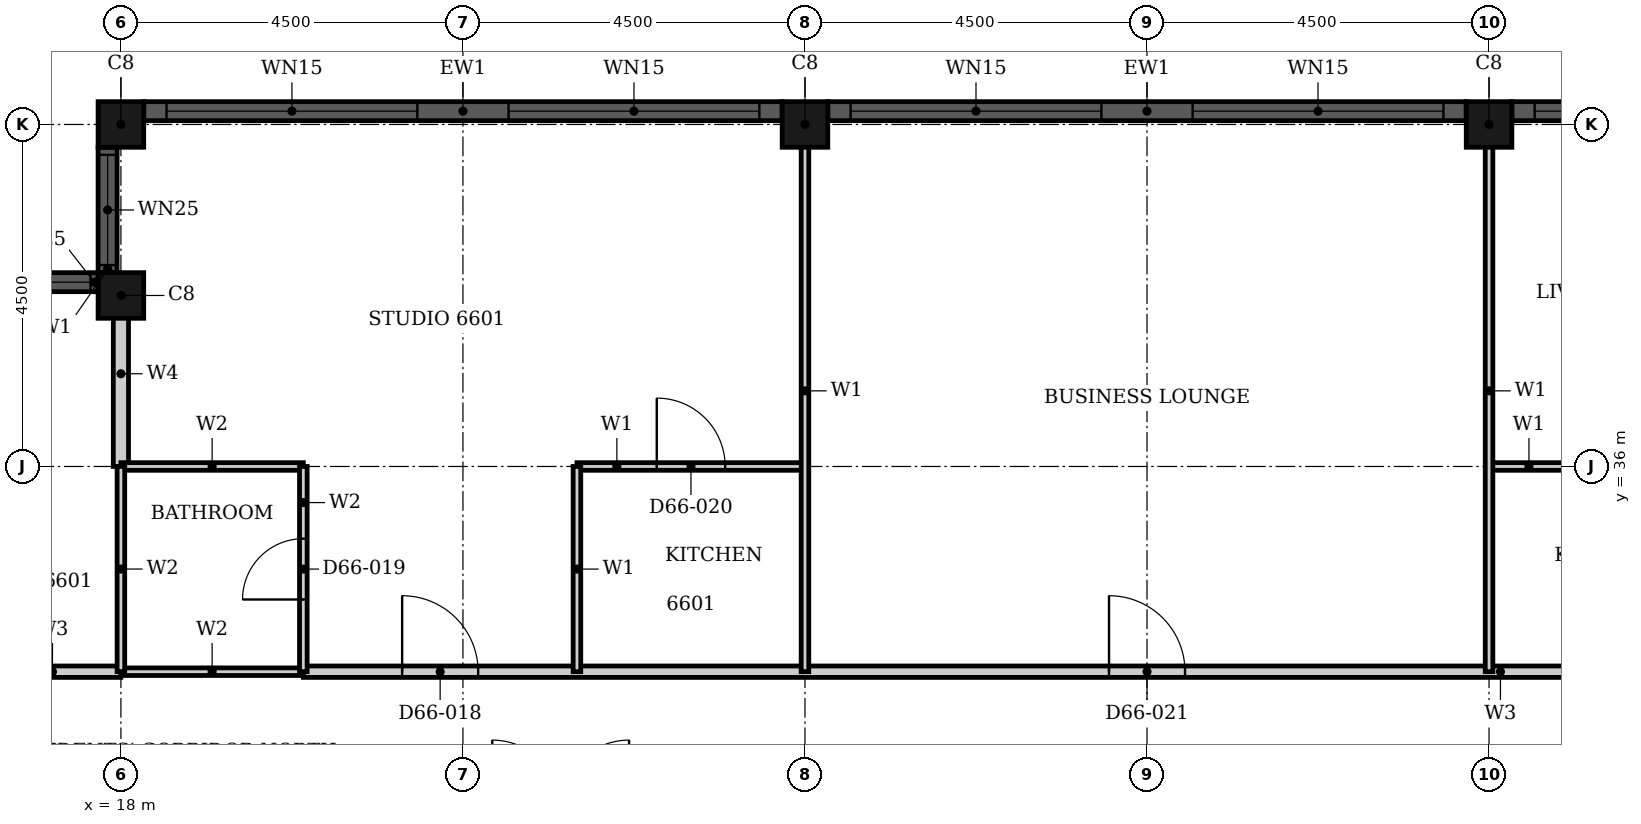
"""IFC4 building model, lengths in metres.
Left out: names, types, materials, properties, quantities, classifications, styles, units other than length and angle.
Written with IfcOpenShell. Run it as: python <this file> out.ifc"""

import sys

from ifc_helpers import new_model, si_unit, direction, frame, frame_2d, origin, origin_2d, place, context, subcontext, project, spatial, rectangle, hollow_rectangle, extrude, element, fill, save


model = new_model("IFC4")
c1 = context("Model", 3, precision=1e-05, world=origin(), true_north=direction((0.0, 1.0)))
c2 = subcontext(c1, "Body", "Model", "MODEL_VIEW")
j1 = project(units=[si_unit("LENGTHUNIT", "METRE"), si_unit("PLANEANGLEUNIT", "RADIAN")], contexts=[c1])
p1 = place(None, origin())
s1 = spatial("IfcSite", under=j1, at=p1, CompositionType="ELEMENT")
p2 = place(p1, origin())
s2 = spatial("IfcBuilding", under=s1, at=p2, CompositionType="ELEMENT")
p3 = place(p2, frame((0.0, 0.0, 260.1)))
s3 = spatial("IfcBuildingStorey", under=s2, at=p3, CompositionType="ELEMENT", Elevation=260.1)
for number, where, z_axis, x_axis in (
    (1, (36.0, 40.5, 0.0), (0.0, 0.0, 1.0), (1.0, 0.0, 0.0)),
    (2, (27.0, 40.5, 0.0), (0.0, 0.0, 1.0), (1.0, 0.0, 0.0)),
    (3, (18.0, 40.5, 0.0), (0.0, 0.0, 1.0), (1.0, 0.0, 0.0)),
    (4, (18.0, 38.25, 0.0), (0.0, 0.0, 1.0), (1.0, 0.0, 0.0)),
):
    element("IfcColumn", number, at=place(p3, frame(where, z_axis=z_axis, x_axis=x_axis)), inside=s3, PredefinedType="COLUMN", context=c2, shape_type="SweptSolid", body=[
        extrude(hollow_rectangle(XDim=0.6, YDim=0.6, WallThickness=0.02, at=origin_2d()), origin(), (0.0, 0.0, 1.0), 3.7),
    ])
p4 = place(p3, frame((44.7, 40.675, 0.0), z_axis=(0.0, 0.0, 1.0), x_axis=(-1.0, 0.0, 0.0)))
e5 = element("IfcWall", 5, at=p4, inside=s3, PredefinedType="SOLIDWALL", context=c2, shape_type="SweptSolid", body=[
    extrude(rectangle(XDim=8.4, YDim=0.25, at=frame_2d((4.2, 0.0))), origin(), (0.0, 0.0, 1.0), 3.7),
])
p5 = place(p4, frame((0.3, 0.0, 0.45)))
e6 = element("IfcOpeningElement", 6, at=p5, cuts=e5, PredefinedType="OPENING", context=c2, shape_type="SweptSolid", body=[
    extrude(rectangle(XDim=3.3, YDim=2.3, at=frame_2d((1.65, 1.15))), frame((0.0, 0.135, 0.0), z_axis=(0.0, -1.0, 0.0), x_axis=(1.0, 0.0, 0.0)), (0.0, 0.0, 1.0), 0.27),
])
p6 = place(p4, frame((4.8, 0.0, 0.45)))
e7 = element("IfcOpeningElement", 7, at=p6, cuts=e5, PredefinedType="OPENING", context=c2, shape_type="SweptSolid", body=[
    extrude(rectangle(XDim=3.3, YDim=2.3, at=frame_2d((1.65, 1.15))), frame((0.0, 0.135, 0.0), z_axis=(0.0, -1.0, 0.0), x_axis=(1.0, 0.0, 0.0)), (0.0, 0.0, 1.0), 0.27),
])
p7 = place(p3, frame((35.7, 40.675, 0.0), z_axis=(0.0, 0.0, 1.0), x_axis=(-1.0, 0.0, 0.0)))
e8 = element("IfcWall", 8, at=p7, inside=s3, PredefinedType="SOLIDWALL", context=c2, shape_type="SweptSolid", body=[
    extrude(rectangle(XDim=8.4, YDim=0.25, at=frame_2d((4.2, 0.0))), origin(), (0.0, 0.0, 1.0), 3.7),
])
p8 = place(p7, frame((0.3, 0.0, 0.45)))
e9 = element("IfcOpeningElement", 9, at=p8, cuts=e8, PredefinedType="OPENING", context=c2, shape_type="SweptSolid", body=[
    extrude(rectangle(XDim=3.3, YDim=2.3, at=frame_2d((1.65, 1.15))), frame((0.0, 0.135, 0.0), z_axis=(0.0, -1.0, 0.0), x_axis=(1.0, 0.0, 0.0)), (0.0, 0.0, 1.0), 0.27),
])
p9 = place(p7, frame((4.8, 0.0, 0.45)))
e10 = element("IfcOpeningElement", 10, at=p9, cuts=e8, PredefinedType="OPENING", context=c2, shape_type="SweptSolid", body=[
    extrude(rectangle(XDim=3.3, YDim=2.3, at=frame_2d((1.65, 1.15))), frame((0.0, 0.135, 0.0), z_axis=(0.0, -1.0, 0.0), x_axis=(1.0, 0.0, 0.0)), (0.0, 0.0, 1.0), 0.27),
])
p10 = place(p3, frame((26.7, 40.675, 0.0), z_axis=(0.0, 0.0, 1.0), x_axis=(-1.0, 0.0, 0.0)))
e11 = element("IfcWall", 11, at=p10, inside=s3, PredefinedType="SOLIDWALL", context=c2, shape_type="SweptSolid", body=[
    extrude(rectangle(XDim=8.4, YDim=0.25, at=frame_2d((4.2, 0.0))), origin(), (0.0, 0.0, 1.0), 3.7),
])
p11 = place(p10, frame((0.3, 0.0, 0.45)))
e12 = element("IfcOpeningElement", 12, at=p11, cuts=e11, PredefinedType="OPENING", context=c2, shape_type="SweptSolid", body=[
    extrude(rectangle(XDim=3.3, YDim=2.3, at=frame_2d((1.65, 1.15))), frame((0.0, 0.135, 0.0), z_axis=(0.0, -1.0, 0.0), x_axis=(1.0, 0.0, 0.0)), (0.0, 0.0, 1.0), 0.27),
])
p12 = place(p10, frame((4.8, 0.0, 0.45)))
e13 = element("IfcOpeningElement", 13, at=p12, cuts=e11, PredefinedType="OPENING", context=c2, shape_type="SweptSolid", body=[
    extrude(rectangle(XDim=3.3, YDim=2.3, at=frame_2d((1.65, 1.15))), frame((0.0, 0.135, 0.0), z_axis=(0.0, -1.0, 0.0), x_axis=(1.0, 0.0, 0.0)), (0.0, 0.0, 1.0), 0.27),
])
p13 = place(p3, frame((17.825, 40.2, 0.0), z_axis=(0.0, 0.0, 1.0), x_axis=(0.0, -1.0, 0.0)))
e14 = element("IfcWall", 14, at=p13, inside=s3, PredefinedType="SOLIDWALL", context=c2, shape_type="SweptSolid", body=[
    extrude(rectangle(XDim=1.65, YDim=0.25, at=frame_2d((0.825, 0.0))), origin(), (0.0, 0.0, 1.0), 3.7),
])
p14 = place(p13, frame((0.1, 0.0, 0.9)))
e15 = element("IfcOpeningElement", 15, at=p14, cuts=e14, PredefinedType="OPENING", context=c2, shape_type="SweptSolid", body=[
    extrude(rectangle(XDim=1.45, YDim=1.85, at=frame_2d((0.725, 0.925))), frame((0.0, 0.135, 0.0), z_axis=(0.0, -1.0, 0.0), x_axis=(1.0, 0.0, 0.0)), (0.0, 0.0, 1.0), 0.27),
])
p15 = place(p3, frame((17.7, 38.425, 0.0), z_axis=(0.0, 0.0, 1.0), x_axis=(-1.0, 0.0, 0.0)))
e16 = element("IfcWall", 16, at=p15, inside=s3, PredefinedType="SOLIDWALL", context=c2, shape_type="SweptSolid", body=[
    extrude(rectangle(XDim=1.65, YDim=0.25, at=frame_2d((0.825, 0.0))), origin(), (0.0, 0.0, 1.0), 3.7),
])
p16 = place(p15, frame((0.1, 0.0, 0.9)))
e17 = element("IfcOpeningElement", 17, at=p16, cuts=e16, PredefinedType="OPENING", context=c2, shape_type="SweptSolid", body=[
    extrude(rectangle(XDim=1.45, YDim=1.85, at=frame_2d((0.725, 0.925))), frame((0.0, 0.135, 0.0), z_axis=(0.0, -1.0, 0.0), x_axis=(1.0, 0.0, 0.0)), (0.0, 0.0, 1.0), 0.27),
])
p17 = place(p3, frame((20.4, 33.3, 0.0), z_axis=(0.0, 0.0, 1.0), x_axis=(1.0, 0.0, 0.0)))
e18 = element("IfcWall", 18, at=p17, inside=s3, PredefinedType="PARTITIONING", context=c2, shape_type="SweptSolid", body=[
    extrude(rectangle(XDim=22.2, YDim=0.15, at=frame_2d((11.1, 0.0))), origin(), (0.0, 0.0, 1.0), 3.4),
])
p18 = place(p17, frame((1.3, 0.0, 0.0)))
e19 = element("IfcOpeningElement", 19, at=p18, cuts=e18, PredefinedType="OPENING", context=c2, shape_type="SweptSolid", body=[
    extrude(rectangle(XDim=1.0, YDim=2.2, at=frame_2d((0.5, 1.1))), frame((0.0, 0.085, 0.0), z_axis=(0.0, -1.0, 0.0), x_axis=(1.0, 0.0, 0.0)), (0.0, 0.0, 1.0), 0.17),
])
p19 = place(p17, frame((10.6, 0.0, 0.0)))
e20 = element("IfcOpeningElement", 20, at=p19, cuts=e18, PredefinedType="OPENING", context=c2, shape_type="SweptSolid", body=[
    extrude(rectangle(XDim=1.0, YDim=2.1, at=frame_2d((0.5, 1.05))), frame((0.0, 0.085, 0.0), z_axis=(0.0, -1.0, 0.0), x_axis=(1.0, 0.0, 0.0)), (0.0, 0.0, 1.0), 0.17),
])
p20 = place(p17, frame((19.9, 0.0, 0.0)))
e21 = element("IfcOpeningElement", 21, at=p20, cuts=e18, PredefinedType="OPENING", context=c2, shape_type="SweptSolid", body=[
    extrude(rectangle(XDim=1.0, YDim=2.2, at=frame_2d((0.5, 1.1))), frame((0.0, 0.085, 0.0), z_axis=(0.0, -1.0, 0.0), x_axis=(1.0, 0.0, 0.0)), (0.0, 0.0, 1.0), 0.17),
])
p21 = place(p3, frame((16.2, 33.3, 0.0), z_axis=(0.0, 0.0, 1.0), x_axis=(1.0, 0.0, 0.0)))
e22 = element("IfcWall", 22, at=p21, inside=s3, PredefinedType="PARTITIONING", context=c2, shape_type="SweptSolid", body=[
    extrude(rectangle(XDim=1.799, YDim=0.15, at=frame_2d((0.899, 0.0))), origin(), (0.0, 0.0, 1.0), 3.4),
])
p22 = place(p3, frame((24.0, 36.0, 0.0), z_axis=(0.0, 0.0, 1.0), x_axis=(1.0, 0.0, 0.0)))
e23 = element("IfcWall", 23, at=p22, inside=s3, PredefinedType="PARTITIONING", context=c2, shape_type="SweptSolid", body=[
    extrude(rectangle(XDim=3.0, YDim=0.1, at=frame_2d((1.5, 0.0))), origin(), (0.0, 0.0, 1.0), 3.4),
])
p23 = place(p22, frame((1.05, 0.0, 0.0)))
e24 = element("IfcOpeningElement", 24, at=p23, cuts=e23, PredefinedType="OPENING", context=c2, shape_type="SweptSolid", body=[
    extrude(rectangle(XDim=0.9, YDim=2.1, at=frame_2d((0.45, 1.05))), frame((0.0, 0.06, 0.0), z_axis=(0.0, -1.0, 0.0), x_axis=(1.0, 0.0, 0.0)), (0.0, 0.0, 1.0), 0.12),
])
p24 = place(p3, frame((36.0, 36.0, 0.0), z_axis=(0.0, 0.0, 1.0), x_axis=(1.0, 0.0, 0.0)))
e25 = element("IfcWall", 25, at=p24, inside=s3, PredefinedType="PARTITIONING", context=c2, shape_type="SweptSolid", body=[
    extrude(rectangle(XDim=3.0, YDim=0.1, at=frame_2d((1.5, 0.0))), origin(), (0.0, 0.0, 1.0), 3.4),
])
p25 = place(p24, frame((1.05, 0.0, 0.0)))
e26 = element("IfcOpeningElement", 26, at=p25, cuts=e25, PredefinedType="OPENING", context=c2, shape_type="SweptSolid", body=[
    extrude(rectangle(XDim=0.9, YDim=2.1, at=frame_2d((0.45, 1.05))), frame((0.0, 0.06, 0.0), z_axis=(0.0, -1.0, 0.0), x_axis=(1.0, 0.0, 0.0)), (0.0, 0.0, 1.0), 0.12),
])
p26 = place(p3, frame((24.0, 33.3, 0.0), z_axis=(0.0, 0.0, 1.0), x_axis=(0.0, 1.0, 0.0)))
e27 = element("IfcWall", 27, at=p26, inside=s3, PredefinedType="PARTITIONING", context=c2, shape_type="SweptSolid", body=[
    extrude(rectangle(XDim=2.7, YDim=0.1, at=frame_2d((1.35, 0.0))), origin(), (0.0, 0.0, 1.0), 3.4),
])
for number, where, z_axis, x_axis in (
    (28, (27.0, 33.3, 0.0), (0.0, 0.0, 1.0), (0.0, 1.0, 0.0)),
    (29, (36.0, 33.3, 0.0), (0.0, 0.0, 1.0), (0.0, 1.0, 0.0)),
):
    element("IfcWall", number, at=place(p3, frame(where, z_axis=z_axis, x_axis=x_axis)), inside=s3, PredefinedType="PARTITIONING", context=c2, shape_type="SweptSolid", body=[
        extrude(rectangle(XDim=7.39, YDim=0.1, at=frame_2d((3.695, 0.0))), origin(), (0.0, 0.0, 1.0), 3.4),
    ])
p27 = place(p3, frame((18.0, 36.0, 0.0), z_axis=(0.0, 0.0, 1.0), x_axis=(0.0, 1.0, 0.0)))
e30 = element("IfcWall", 30, at=p27, inside=s3, PredefinedType="PARTITIONING", context=c2, shape_type="SweptSolid", body=[
    extrude(rectangle(XDim=2.44, YDim=0.2, at=frame_2d((1.22, 0.0))), origin(), (0.0, 0.0, 1.0), 3.4),
])
for number, where, z_axis, x_axis in (
    (31, (18.0, 33.3, 0.0), (0.0, 0.0, 1.0), (1.0, 0.0, 0.0)),
    (32, (18.0, 36.0, 0.0), (0.0, 0.0, 1.0), (1.0, 0.0, 0.0)),
):
    element("IfcWall", number, at=place(p3, frame(where, z_axis=z_axis, x_axis=x_axis)), inside=s3, PredefinedType="PARTITIONING", context=c2, shape_type="SweptSolid", body=[
        extrude(rectangle(XDim=2.4, YDim=0.1, at=frame_2d((1.2, 0.0))), origin(), (0.0, 0.0, 1.0), 3.4),
    ])
p28 = place(p3, frame((18.0, 33.301, 0.0), z_axis=(0.0, 0.0, 1.0), x_axis=(0.0, 1.0, 0.0)))
e33 = element("IfcWall", 33, at=p28, inside=s3, PredefinedType="PARTITIONING", context=c2, shape_type="SweptSolid", body=[
    extrude(rectangle(XDim=2.699, YDim=0.1, at=frame_2d((1.35, 0.0))), origin(), (0.0, 0.0, 1.0), 3.4),
])
p29 = place(p3, frame((20.4, 33.3, 0.0), z_axis=(0.0, 0.0, 1.0), x_axis=(0.0, 1.0, 0.0)))
e34 = element("IfcWall", 34, at=p29, inside=s3, PredefinedType="PARTITIONING", context=c2, shape_type="SweptSolid", body=[
    extrude(rectangle(XDim=2.7, YDim=0.1, at=frame_2d((1.35, 0.0))), origin(), (0.0, 0.0, 1.0), 3.4),
])
p30 = place(p29, frame((0.95, 0.0, 0.0)))
e35 = element("IfcOpeningElement", 35, at=p30, cuts=e34, PredefinedType="OPENING", context=c2, shape_type="SweptSolid", body=[
    extrude(rectangle(XDim=0.8, YDim=2.1, at=frame_2d((0.4, 1.05))), frame((0.0, 0.06, 0.0), z_axis=(0.0, -1.0, 0.0), x_axis=(1.0, 0.0, 0.0)), (0.0, 0.0, 1.0), 0.12),
])
p31 = place(p6, origin())
e36 = element("IfcWindow", 36, at=p31, inside=s3, PartitioningType="SINGLE_PANEL", PredefinedType="WINDOW", context=c2, shape_type="SweptSolid", body=[
    extrude(rectangle(XDim=3.3, YDim=2.3, at=frame_2d((1.65, 1.15))), frame((0.0, 0.03, 0.0), z_axis=(0.0, -1.0, 0.0), x_axis=(1.0, 0.0, 0.0)), (0.0, 0.0, 1.0), 0.06),
])
fill(e7, e36)
p32 = place(p8, origin())
e37 = element("IfcWindow", 37, at=p32, inside=s3, PartitioningType="SINGLE_PANEL", PredefinedType="WINDOW", context=c2, shape_type="SweptSolid", body=[
    extrude(rectangle(XDim=3.3, YDim=2.3, at=frame_2d((1.65, 1.15))), frame((0.0, 0.03, 0.0), z_axis=(0.0, -1.0, 0.0), x_axis=(1.0, 0.0, 0.0)), (0.0, 0.0, 1.0), 0.06),
])
fill(e9, e37)
p33 = place(p9, origin())
e38 = element("IfcWindow", 38, at=p33, inside=s3, PartitioningType="SINGLE_PANEL", PredefinedType="WINDOW", context=c2, shape_type="SweptSolid", body=[
    extrude(rectangle(XDim=3.3, YDim=2.3, at=frame_2d((1.65, 1.15))), frame((0.0, 0.03, 0.0), z_axis=(0.0, -1.0, 0.0), x_axis=(1.0, 0.0, 0.0)), (0.0, 0.0, 1.0), 0.06),
])
fill(e10, e38)
p34 = place(p11, origin())
e39 = element("IfcWindow", 39, at=p34, inside=s3, PartitioningType="SINGLE_PANEL", PredefinedType="WINDOW", context=c2, shape_type="SweptSolid", body=[
    extrude(rectangle(XDim=3.3, YDim=2.3, at=frame_2d((1.65, 1.15))), frame((0.0, 0.03, 0.0), z_axis=(0.0, -1.0, 0.0), x_axis=(1.0, 0.0, 0.0)), (0.0, 0.0, 1.0), 0.06),
])
fill(e12, e39)
p35 = place(p12, origin())
e40 = element("IfcWindow", 40, at=p35, inside=s3, PartitioningType="SINGLE_PANEL", PredefinedType="WINDOW", context=c2, shape_type="SweptSolid", body=[
    extrude(rectangle(XDim=3.3, YDim=2.3, at=frame_2d((1.65, 1.15))), frame((0.0, 0.03, 0.0), z_axis=(0.0, -1.0, 0.0), x_axis=(1.0, 0.0, 0.0)), (0.0, 0.0, 1.0), 0.06),
])
fill(e13, e40)
p36 = place(p14, origin())
e41 = element("IfcWindow", 41, at=p36, inside=s3, PartitioningType="SINGLE_PANEL", PredefinedType="WINDOW", context=c2, shape_type="SweptSolid", body=[
    extrude(rectangle(XDim=1.45, YDim=1.85, at=frame_2d((0.725, 0.925))), frame((0.0, 0.03, 0.0), z_axis=(0.0, -1.0, 0.0), x_axis=(1.0, 0.0, 0.0)), (0.0, 0.0, 1.0), 0.06),
])
fill(e15, e41)
p37 = place(p16, origin())
e42 = element("IfcWindow", 42, at=p37, inside=s3, PartitioningType="SINGLE_PANEL", PredefinedType="WINDOW", context=c2, shape_type="SweptSolid", body=[
    extrude(rectangle(XDim=1.45, YDim=1.85, at=frame_2d((0.725, 0.925))), frame((0.0, 0.03, 0.0), z_axis=(0.0, -1.0, 0.0), x_axis=(1.0, 0.0, 0.0)), (0.0, 0.0, 1.0), 0.06),
])
fill(e17, e42)
p38 = place(p18, origin())
e43 = element("IfcDoor", 43, at=p38, inside=s3, OperationType="SINGLE_SWING_LEFT", PredefinedType="DOOR", context=c2, shape_type="SweptSolid", body=[
    extrude(rectangle(XDim=1.0, YDim=2.2, at=frame_2d((0.5, 1.1))), frame((0.0, 0.025, 0.0), z_axis=(0.0, -1.0, 0.0), x_axis=(1.0, 0.0, 0.0)), (0.0, 0.0, 1.0), 0.05),
])
fill(e19, e43)
p39 = place(p30, origin())
e44 = element("IfcDoor", 44, at=p39, inside=s3, OperationType="SINGLE_SWING_RIGHT", PredefinedType="DOOR", context=c2, shape_type="SweptSolid", body=[
    extrude(rectangle(XDim=0.8, YDim=2.1, at=frame_2d((0.4, 1.05))), frame((0.0, 0.025, 0.0), z_axis=(0.0, -1.0, 0.0), x_axis=(1.0, 0.0, 0.0)), (0.0, 0.0, 1.0), 0.05),
])
fill(e35, e44)
p40 = place(p23, origin())
e45 = element("IfcDoor", 45, at=p40, inside=s3, OperationType="SINGLE_SWING_RIGHT", PredefinedType="DOOR", context=c2, shape_type="SweptSolid", body=[
    extrude(rectangle(XDim=0.9, YDim=2.1, at=frame_2d((0.45, 1.05))), frame((0.0, 0.025, 0.0), z_axis=(0.0, -1.0, 0.0), x_axis=(1.0, 0.0, 0.0)), (0.0, 0.0, 1.0), 0.05),
])
fill(e24, e45)
p41 = place(p19, origin())
e46 = element("IfcDoor", 46, at=p41, inside=s3, OperationType="SINGLE_SWING_LEFT", PredefinedType="DOOR", context=c2, shape_type="SweptSolid", body=[
    extrude(rectangle(XDim=1.0, YDim=2.1, at=frame_2d((0.5, 1.05))), frame((0.0, 0.025, 0.0), z_axis=(0.0, -1.0, 0.0), x_axis=(1.0, 0.0, 0.0)), (0.0, 0.0, 1.0), 0.05),
])
fill(e20, e46)
save(model, sys.argv[1])
